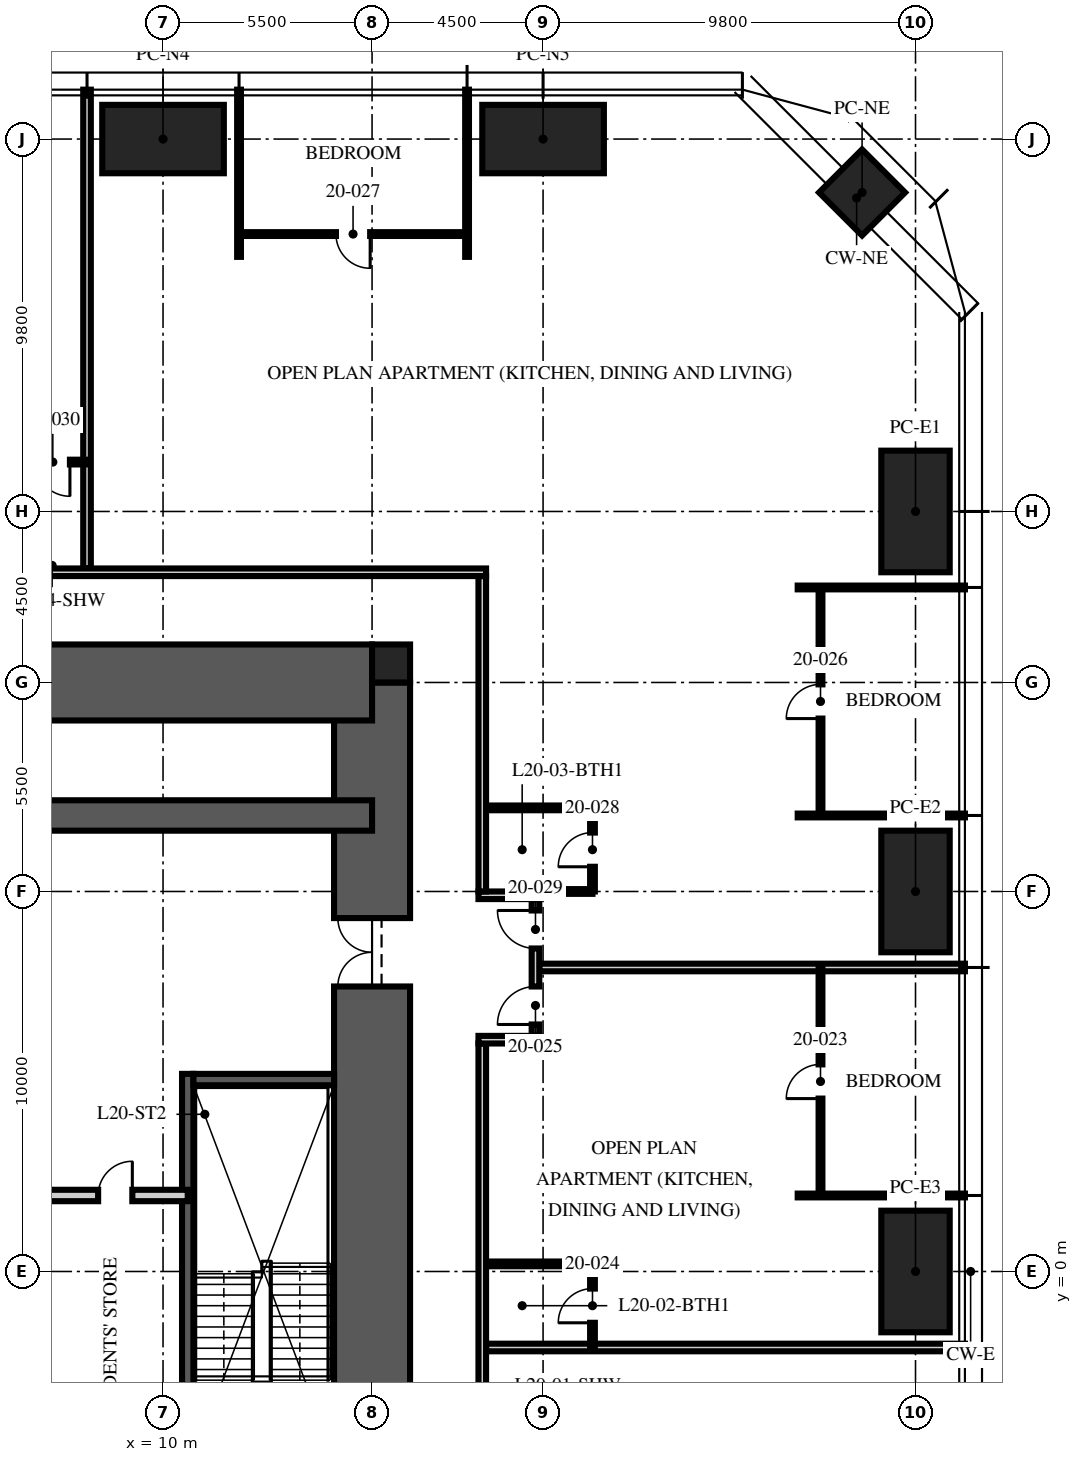
"""IFC4 building model, lengths in metres.
Left out: names, types, materials, properties, quantities, classifications, styles, units other than length and angle.
Written with IfcOpenShell. Run it as: python <this file> out.ifc"""

import sys

from ifc_helpers import new_model, si_unit, direction, frame, frame_2d, origin, origin_2d, place, context, subcontext, project, spatial, rectangle, hollow_rectangle, extrude, element, fill, save


model = new_model("IFC4")
c1 = context("Model", 3, precision=1e-05, world=origin(), true_north=direction((0.0, 1.0)))
c2 = subcontext(c1, "Body", "Model", "MODEL_VIEW")
j1 = project(units=[si_unit("LENGTHUNIT", "METRE"), si_unit("PLANEANGLEUNIT", "RADIAN")], contexts=[c1])
p1 = place(None, origin())
s1 = spatial("IfcSite", under=j1, at=p1, CompositionType="ELEMENT")
p2 = place(p1, origin())
s2 = spatial("IfcBuilding", under=s1, at=p2, CompositionType="ELEMENT")
p3 = place(p2, frame((0.0, 0.0, 81.0)))
s3 = spatial("IfcBuildingStorey", under=s2, at=p3, CompositionType="ELEMENT", Elevation=81.0)
p4 = place(p3, frame((15.5, -15.5, -0.25), z_axis=(0.0, 0.0, 1.0), x_axis=(0.0, 1.0, 0.0)))
e1 = element("IfcWall", 1, at=p4, inside=s3, PredefinedType="SHEAR", context=c2, shape_type="SweptSolid", body=[
    extrude(rectangle(XDim=31.0, YDim=2.0, at=frame_2d((15.5, 0.0))), origin(), (0.0, 0.0, 1.0), 3.75),
])
p5 = place(p4, frame((6.5, 0.0, 0.25)))
e2 = element("IfcOpeningElement", 2, at=p5, cuts=e1, PredefinedType="OPENING", context=c2, shape_type="SweptSolid", body=[
    extrude(rectangle(XDim=1.2, YDim=2.1, at=frame_2d((0.6, 1.05))), frame((0.0, 1.01, 0.0), z_axis=(0.0, -1.0, 0.0), x_axis=(1.0, 0.0, 0.0)), (0.0, 0.0, 1.0), 2.02),
])
p6 = place(p4, frame((23.0, 0.0, 0.25)))
e3 = element("IfcOpeningElement", 3, at=p6, cuts=e1, PredefinedType="OPENING", context=c2, shape_type="SweptSolid", body=[
    extrude(rectangle(XDim=1.8, YDim=2.1, at=frame_2d((0.9, 1.05))), frame((0.0, 1.01, 0.0), z_axis=(0.0, -1.0, 0.0), x_axis=(1.0, 0.0, 0.0)), (0.0, 0.0, 1.0), 2.02),
])
p7 = place(p3, frame((-15.5, 15.5, -0.25), z_axis=(0.0, 0.0, 1.0), x_axis=(1.0, 0.0, 0.0)))
e4 = element("IfcWall", 4, at=p7, inside=s3, PredefinedType="SHEAR", context=c2, shape_type="SweptSolid", body=[
    extrude(rectangle(XDim=31.0, YDim=2.0, at=frame_2d((15.5, 0.0))), origin(), (0.0, 0.0, 1.0), 3.75),
])
p8 = place(p7, frame((10.4, 0.0, 0.25)))
e5 = element("IfcOpeningElement", 5, at=p8, cuts=e4, PredefinedType="OPENING", context=c2, shape_type="SweptSolid", body=[
    extrude(rectangle(XDim=1.1, YDim=2.1, at=frame_2d((0.55, 1.05))), frame((0.0, 1.01, 0.0), z_axis=(0.0, -1.0, 0.0), x_axis=(1.0, 0.0, 0.0)), (0.0, 0.0, 1.0), 2.02),
])
p9 = place(p7, frame((13.5, 0.0, 0.25)))
e6 = element("IfcOpeningElement", 6, at=p9, cuts=e4, PredefinedType="OPENING", context=c2, shape_type="SweptSolid", body=[
    extrude(rectangle(XDim=1.1, YDim=2.1, at=frame_2d((0.55, 1.05))), frame((0.0, 1.01, 0.0), z_axis=(0.0, -1.0, 0.0), x_axis=(1.0, 0.0, 0.0)), (0.0, 0.0, 1.0), 2.02),
])
p10 = place(p7, frame((16.6, 0.0, 0.25)))
e7 = element("IfcOpeningElement", 7, at=p10, cuts=e4, PredefinedType="OPENING", context=c2, shape_type="SweptSolid", body=[
    extrude(rectangle(XDim=1.1, YDim=2.1, at=frame_2d((0.55, 1.05))), frame((0.0, 1.01, 0.0), z_axis=(0.0, -1.0, 0.0), x_axis=(1.0, 0.0, 0.0)), (0.0, 0.0, 1.0), 2.02),
])
p11 = place(p3, frame((-15.5, 12.0, -0.25), z_axis=(0.0, 0.0, 1.0), x_axis=(1.0, 0.0, 0.0)))
e8 = element("IfcWall", 8, at=p11, inside=s3, PredefinedType="SHEAR", context=c2, shape_type="SweptSolid", body=[
    extrude(rectangle(XDim=31.0, YDim=0.8, at=frame_2d((15.5, 0.0))), origin(), (0.0, 0.0, 1.0), 3.75),
])
p12 = place(p3, frame((16.0, 16.0, -0.25), z_axis=(0.0, 0.0, 1.0), x_axis=(1.0, 0.0, 0.0)))
e9 = element("IfcColumn", 9, at=p12, inside=s3, PredefinedType="COLUMN", context=c2, shape_type="SweptSolid", body=[
    extrude(rectangle(XDim=1.0, YDim=1.0, at=origin_2d()), origin(), (0.0, 0.0, 1.0), 3.75),
])
for number, where, z_axis, x_axis in (
    (10, (10.0, 29.8, 0.0), (0.0, 0.0, 1.0), (1.0, 0.0, 0.0)),
    (11, (20.0, 29.8, 0.0), (0.0, 0.0, 1.0), (1.0, 0.0, 0.0)),
    (12, (29.8, 20.0, 0.0), (0.0, 0.0, 1.0), (0.0, 1.0, 0.0)),
    (13, (29.8, 10.0, 0.0), (0.0, 0.0, 1.0), (0.0, 1.0, 0.0)),
    (14, (29.8, 0.0, 0.0), (0.0, 0.0, 1.0), (0.0, 1.0, 0.0)),
):
    element("IfcColumn", number, at=place(p3, frame(where, z_axis=z_axis, x_axis=x_axis)), inside=s3, PredefinedType="COLUMN", context=c2, shape_type="SweptSolid", body=[
        extrude(hollow_rectangle(XDim=3.2, YDim=1.8, WallThickness=0.2, at=origin_2d()), origin(), (0.0, 0.0, 1.0), 3.75),
    ])
p13 = place(p3, frame((28.394, 28.394, 0.0), z_axis=(0.0, 0.0, 1.0), x_axis=(0.707106781187, -0.707106781187, 0.0)))
e15 = element("IfcColumn", 15, at=p13, inside=s3, PredefinedType="COLUMN", context=c2, shape_type="SweptSolid", body=[
    extrude(hollow_rectangle(XDim=1.6, YDim=1.6, WallThickness=0.1, at=origin_2d()), origin(), (0.0, 0.0, 1.0), 3.75),
])
p14 = place(p3, frame((10.65, -4.9, 0.0), z_axis=(0.0, 0.0, 1.0), x_axis=(0.0, 1.0, 0.0)))
e16 = element("IfcWall", 16, at=p14, inside=s3, PredefinedType="SOLIDWALL", context=c2, shape_type="SweptSolid", body=[
    extrude(rectangle(XDim=10.1, YDim=0.3, at=frame_2d((5.05, 0.0))), origin(), (0.0, 0.0, 1.0), 3.5),
])
p15 = place(p3, frame((14.5, 5.05, 0.0), z_axis=(0.0, 0.0, 1.0), x_axis=(-1.0, 0.0, 0.0)))
e17 = element("IfcWall", 17, at=p15, inside=s3, PredefinedType="SOLIDWALL", context=c2, shape_type="SweptSolid", body=[
    extrude(rectangle(XDim=3.7, YDim=0.3, at=frame_2d((1.85, 0.0))), origin(), (0.0, 0.0, 1.0), 3.5),
])
p16 = place(p3, frame((-10.65, 2.0, 0.0), z_axis=(0.0, 0.0, 1.0), x_axis=(1.0, 0.0, 0.0)))
e18 = element("IfcWall", 18, at=p16, inside=s3, PredefinedType="PARTITIONING", context=c2, shape_type="SweptSolid", body=[
    extrude(rectangle(XDim=21.3, YDim=0.3, at=frame_2d((10.65, 0.0))), origin(), (0.0, 0.0, 1.0), 3.5),
])
p17 = place(p16, frame((10.05, 0.0, 0.0)))
e19 = element("IfcOpeningElement", 19, at=p17, cuts=e18, PredefinedType="OPENING", context=c2, shape_type="SweptSolid", body=[
    extrude(rectangle(XDim=1.2, YDim=2.1, at=frame_2d((0.6, 1.05))), frame((0.0, 0.16, 0.0), z_axis=(0.0, -1.0, 0.0), x_axis=(1.0, 0.0, 0.0)), (0.0, 0.0, 1.0), 0.32),
])
p18 = place(p16, frame((18.942, 0.0, 0.0)))
e20 = element("IfcOpeningElement", 20, at=p18, cuts=e18, PredefinedType="OPENING", context=c2, shape_type="SweptSolid", body=[
    extrude(rectangle(XDim=0.9, YDim=2.1, at=frame_2d((0.45, 1.05))), frame((0.0, 0.16, 0.0), z_axis=(0.0, -1.0, 0.0), x_axis=(1.0, 0.0, 0.0)), (0.0, 0.0, 1.0), 0.32),
])
p19 = place(p3, frame((18.5, -2.0, 0.0), z_axis=(0.0, 0.0, 1.0), x_axis=(1.0, 0.0, 0.0)))
e21 = element("IfcWall", 21, at=p19, inside=s3, PredefinedType="PARTITIONING", context=c2, shape_type="SweptSolid", body=[
    extrude(rectangle(XDim=12.6, YDim=0.2, at=frame_2d((6.3, 0.0))), origin(), (0.0, 0.0, 1.0), 2.71),
])
p20 = place(p3, frame((26.7, 2.0, 0.0), z_axis=(0.0, 0.0, 1.0), x_axis=(1.0, 0.0, 0.0)))
e22 = element("IfcWall", 22, at=p20, inside=s3, PredefinedType="PARTITIONING", context=c2, shape_type="SweptSolid", body=[
    extrude(rectangle(XDim=4.4, YDim=0.1, at=frame_2d((2.2, 0.0))), origin(), (0.0, 0.0, 1.0), 2.71),
])
p21 = place(p3, frame((19.9, 8.0, 0.0), z_axis=(0.0, 0.0, 1.0), x_axis=(1.0, 0.0, 0.0)))
e23 = element("IfcWall", 23, at=p21, inside=s3, PredefinedType="PARTITIONING", context=c2, shape_type="SweptSolid", body=[
    extrude(rectangle(XDim=11.2, YDim=0.2, at=frame_2d((5.6, 0.0))), origin(), (0.0, 0.0, 1.0), 2.71),
])
for number, where, z_axis, x_axis in (
    (24, (26.7, 12.0, 0.0), (0.0, 0.0, 1.0), (1.0, 0.0, 0.0)),
    (25, (26.7, 18.0, 0.0), (0.0, 0.0, 1.0), (1.0, 0.0, 0.0)),
    (26, (18.0, 26.7, 0.0), (0.0, 0.0, 1.0), (0.0, 1.0, 0.0)),
    (27, (12.0, 26.7, 0.0), (0.0, 0.0, 1.0), (0.0, 1.0, 0.0)),
):
    element("IfcWall", number, at=place(p3, frame(where, z_axis=z_axis, x_axis=x_axis)), inside=s3, PredefinedType="PARTITIONING", context=c2, shape_type="SweptSolid", body=[
        extrude(rectangle(XDim=4.4, YDim=0.1, at=frame_2d((2.2, 0.0))), origin(), (0.0, 0.0, 1.0), 2.71),
    ])
p22 = place(p3, frame((8.0, 18.5, 0.0), z_axis=(0.0, 0.0, 1.0), x_axis=(0.0, 1.0, 0.0)))
e28 = element("IfcWall", 28, at=p22, inside=s3, PredefinedType="PARTITIONING", context=c2, shape_type="SweptSolid", body=[
    extrude(rectangle(XDim=12.6, YDim=0.2, at=frame_2d((6.3, 0.0))), origin(), (0.0, 0.0, 1.0), 2.71),
])
p23 = place(p3, frame((27.3, 2.0, 0.0), z_axis=(0.0, 0.0, 1.0), x_axis=(0.0, 1.0, 0.0)))
e29 = element("IfcWall", 29, at=p23, inside=s3, PredefinedType="PARTITIONING", context=c2, shape_type="SweptSolid", body=[
    extrude(rectangle(XDim=6.0, YDim=0.1, at=frame_2d((3.0, 0.0))), origin(), (0.0, 0.0, 1.0), 2.61),
])
p24 = place(p23, frame((2.55, 0.0, 0.0)))
e30 = element("IfcOpeningElement", 30, at=p24, cuts=e29, PredefinedType="OPENING", context=c2, shape_type="SweptSolid", body=[
    extrude(rectangle(XDim=0.9, YDim=2.1, at=frame_2d((0.45, 1.05))), frame((0.0, 0.06, 0.0), z_axis=(0.0, -1.0, 0.0), x_axis=(1.0, 0.0, 0.0)), (0.0, 0.0, 1.0), 0.12),
])
p25 = place(p3, frame((21.3, -2.0, 0.0), z_axis=(0.0, 0.0, 1.0), x_axis=(0.0, 1.0, 0.0)))
e31 = element("IfcWall", 31, at=p25, inside=s3, PredefinedType="PARTITIONING", context=c2, shape_type="SweptSolid", body=[
    extrude(rectangle(XDim=2.2, YDim=0.125, at=frame_2d((1.1, 0.0))), origin(), (0.0, 0.0, 1.0), 2.492),
])
p26 = place(p25, frame((0.65, 0.0, 0.0)))
e32 = element("IfcOpeningElement", 32, at=p26, cuts=e31, PredefinedType="OPENING", context=c2, shape_type="SweptSolid", body=[
    extrude(rectangle(XDim=0.9, YDim=2.1, at=frame_2d((0.45, 1.05))), frame((0.0, 0.073, 0.0), z_axis=(0.0, -1.0, 0.0), x_axis=(1.0, 0.0, 0.0)), (0.0, 0.0, 1.0), 0.145),
])
p27 = place(p3, frame((18.5, 0.2, 0.0), z_axis=(0.0, 0.0, 1.0), x_axis=(1.0, 0.0, 0.0)))
e33 = element("IfcWall", 33, at=p27, inside=s3, PredefinedType="PARTITIONING", context=c2, shape_type="SweptSolid", body=[
    extrude(rectangle(XDim=2.8, YDim=0.125, at=frame_2d((1.4, 0.0))), origin(), (0.0, 0.0, 1.0), 2.492),
])
p28 = place(p3, frame((27.3, 12.0, 0.0), z_axis=(0.0, 0.0, 1.0), x_axis=(0.0, 1.0, 0.0)))
e34 = element("IfcWall", 34, at=p28, inside=s3, PredefinedType="PARTITIONING", context=c2, shape_type="SweptSolid", body=[
    extrude(rectangle(XDim=6.0, YDim=0.1, at=frame_2d((3.0, 0.0))), origin(), (0.0, 0.0, 1.0), 2.61),
])
p29 = place(p28, frame((2.55, 0.0, 0.0)))
e35 = element("IfcOpeningElement", 35, at=p29, cuts=e34, PredefinedType="OPENING", context=c2, shape_type="SweptSolid", body=[
    extrude(rectangle(XDim=0.9, YDim=2.1, at=frame_2d((0.45, 1.05))), frame((0.0, 0.06, 0.0), z_axis=(0.0, -1.0, 0.0), x_axis=(1.0, 0.0, 0.0)), (0.0, 0.0, 1.0), 0.12),
])
p30 = place(p3, frame((18.0, 27.3, 0.0), z_axis=(0.0, 0.0, 1.0), x_axis=(-1.0, 0.0, 0.0)))
e36 = element("IfcWall", 36, at=p30, inside=s3, PredefinedType="PARTITIONING", context=c2, shape_type="SweptSolid", body=[
    extrude(rectangle(XDim=6.0, YDim=0.1, at=frame_2d((3.0, 0.0))), origin(), (0.0, 0.0, 1.0), 2.61),
])
p31 = place(p30, frame((2.55, 0.0, 0.0)))
e37 = element("IfcOpeningElement", 37, at=p31, cuts=e36, PredefinedType="OPENING", context=c2, shape_type="SweptSolid", body=[
    extrude(rectangle(XDim=0.9, YDim=2.1, at=frame_2d((0.45, 1.05))), frame((0.0, 0.06, 0.0), z_axis=(0.0, -1.0, 0.0), x_axis=(1.0, 0.0, 0.0)), (0.0, 0.0, 1.0), 0.12),
])
p32 = place(p3, frame((21.3, 10.0, 0.0), z_axis=(0.0, 0.0, 1.0), x_axis=(0.0, 1.0, 0.0)))
e38 = element("IfcWall", 38, at=p32, inside=s3, PredefinedType="PARTITIONING", context=c2, shape_type="SweptSolid", body=[
    extrude(rectangle(XDim=2.2, YDim=0.125, at=frame_2d((1.1, 0.0))), origin(), (0.0, 0.0, 1.0), 2.492),
])
p33 = place(p32, frame((0.65, 0.0, 0.0)))
e39 = element("IfcOpeningElement", 39, at=p33, cuts=e38, PredefinedType="OPENING", context=c2, shape_type="SweptSolid", body=[
    extrude(rectangle(XDim=0.9, YDim=2.1, at=frame_2d((0.45, 1.05))), frame((0.0, 0.073, 0.0), z_axis=(0.0, -1.0, 0.0), x_axis=(1.0, 0.0, 0.0)), (0.0, 0.0, 1.0), 0.145),
])
p34 = place(p3, frame((19.97, 10.0, 0.0), z_axis=(0.0, 0.0, 1.0), x_axis=(1.0, 0.0, 0.0)))
e40 = element("IfcWall", 40, at=p34, inside=s3, PredefinedType="PARTITIONING", context=c2, shape_type="SweptSolid", body=[
    extrude(rectangle(XDim=1.33, YDim=0.125, at=frame_2d((0.665, 0.0))), origin(), (0.0, 0.0, 1.0), 2.492),
])
p35 = place(p3, frame((18.5, 12.2, 0.0), z_axis=(0.0, 0.0, 1.0), x_axis=(1.0, 0.0, 0.0)))
e41 = element("IfcWall", 41, at=p35, inside=s3, PredefinedType="PARTITIONING", context=c2, shape_type="SweptSolid", body=[
    extrude(rectangle(XDim=2.8, YDim=0.125, at=frame_2d((1.4, 0.0))), origin(), (0.0, 0.0, 1.0), 3.5),
])
p36 = place(p3, frame((8.0, 21.3, 0.0), z_axis=(0.0, 0.0, 1.0), x_axis=(-1.0, 0.0, 0.0)))
e42 = element("IfcWall", 42, at=p36, inside=s3, PredefinedType="PARTITIONING", context=c2, shape_type="SweptSolid", body=[
    extrude(rectangle(XDim=1.8, YDim=0.125, at=frame_2d((0.9, 0.0))), origin(), (0.0, 0.0, 1.0), 3.5),
])
p37 = place(p36, frame((0.45, 0.0, 0.0)))
e43 = element("IfcOpeningElement", 43, at=p37, cuts=e42, PredefinedType="OPENING", context=c2, shape_type="SweptSolid", body=[
    extrude(rectangle(XDim=0.9, YDim=2.1, at=frame_2d((0.45, 1.05))), frame((0.0, 0.073, 0.0), z_axis=(0.0, -1.0, 0.0), x_axis=(1.0, 0.0, 0.0)), (0.0, 0.0, 1.0), 0.145),
])
p38 = place(p3, frame((18.4, -6.0, 0.0), z_axis=(0.0, 0.0, 1.0), x_axis=(0.0, 1.0, 0.0)))
e44 = element("IfcWall", 44, at=p38, inside=s3, PredefinedType="PARTITIONING", context=c2, shape_type="SweptSolid", body=[
    extrude(rectangle(XDim=12.0, YDim=0.2, at=frame_2d((6.0, 0.0))), origin(), (0.0, 0.0, 1.0), 2.492),
])
p39 = place(p3, frame((18.3, 6.1, 0.0), z_axis=(0.0, 0.0, 1.0), x_axis=(1.0, 0.0, 0.0)))
e45 = element("IfcWall", 45, at=p39, inside=s3, PredefinedType="PARTITIONING", context=c2, shape_type="SweptSolid", body=[
    extrude(rectangle(XDim=1.6, YDim=0.2, at=frame_2d((0.8, 0.0))), origin(), (0.0, 0.0, 1.0), 3.5),
])
p40 = place(p3, frame((18.3, 9.9, 0.0), z_axis=(0.0, 0.0, 1.0), x_axis=(1.0, 0.0, 0.0)))
e46 = element("IfcWall", 46, at=p40, inside=s3, PredefinedType="PARTITIONING", context=c2, shape_type="SweptSolid", body=[
    extrude(rectangle(XDim=1.6, YDim=0.2, at=frame_2d((0.8, 0.0))), origin(), (0.0, 0.0, 1.0), 2.492),
])
p41 = place(p3, frame((19.8, 6.2, 0.0), z_axis=(0.0, 0.0, 1.0), x_axis=(0.0, 1.0, 0.0)))
e47 = element("IfcWall", 47, at=p41, inside=s3, PredefinedType="PARTITIONING", context=c2, shape_type="SweptSolid", body=[
    extrude(rectangle(XDim=3.6, YDim=0.2, at=frame_2d((1.8, 0.0))), origin(), (0.0, 0.0, 1.0), 3.5),
])
p42 = place(p41, frame((0.3, 0.0, 0.0)))
e48 = element("IfcOpeningElement", 48, at=p42, cuts=e47, PredefinedType="OPENING", context=c2, shape_type="SweptSolid", body=[
    extrude(rectangle(XDim=1.0, YDim=2.2, at=frame_2d((0.5, 1.1))), frame((0.0, 0.11, 0.0), z_axis=(0.0, -1.0, 0.0), x_axis=(1.0, 0.0, 0.0)), (0.0, 0.0, 1.0), 0.22),
])
p43 = place(p41, frame((2.3, 0.0, 0.0)))
e49 = element("IfcOpeningElement", 49, at=p43, cuts=e47, PredefinedType="OPENING", context=c2, shape_type="SweptSolid", body=[
    extrude(rectangle(XDim=1.0, YDim=2.2, at=frame_2d((0.5, 1.1))), frame((0.0, 0.11, 0.0), z_axis=(0.0, -1.0, 0.0), x_axis=(1.0, 0.0, 0.0)), (0.0, 0.0, 1.0), 0.22),
])
p44 = place(p3, frame((18.4, 10.0, 0.0), z_axis=(0.0, 0.0, 1.0), x_axis=(0.0, 1.0, 0.0)))
e50 = element("IfcWall", 50, at=p44, inside=s3, PredefinedType="PARTITIONING", context=c2, shape_type="SweptSolid", body=[
    extrude(rectangle(XDim=8.3, YDim=0.2, at=frame_2d((4.15, 0.0))), origin(), (0.0, 0.0, 1.0), 2.3),
])
p45 = place(p3, frame((4.0, 18.4, 0.0), z_axis=(0.0, 0.0, 1.0), x_axis=(1.0, 0.0, 0.0)))
e51 = element("IfcWall", 51, at=p45, inside=s3, PredefinedType="PARTITIONING", context=c2, shape_type="SweptSolid", body=[
    extrude(rectangle(XDim=14.5, YDim=0.2, at=frame_2d((7.25, 0.0))), origin(), (0.0, 0.0, 1.0), 2.3),
])
p46 = place(p6, origin())
e52 = element("IfcDoor", 52, at=p46, inside=s3, OperationType="DOUBLE_DOOR_SINGLE_SWING", PredefinedType="DOOR", context=c2, shape_type="SweptSolid", body=[
    extrude(rectangle(XDim=1.8, YDim=2.1, at=frame_2d((0.9, 1.05))), frame((0.0, 0.025, 0.0), z_axis=(0.0, -1.0, 0.0), x_axis=(1.0, 0.0, 0.0)), (0.0, 0.0, 1.0), 0.05),
])
fill(e3, e52)
p47 = place(p18, origin())
e53 = element("IfcDoor", 53, at=p47, inside=s3, OperationType="SINGLE_SWING_RIGHT", PredefinedType="DOOR", context=c2, shape_type="SweptSolid", body=[
    extrude(rectangle(XDim=0.9, YDim=2.1, at=frame_2d((0.45, 1.05))), frame((0.0, 0.025, 0.0), z_axis=(0.0, -1.0, 0.0), x_axis=(1.0, 0.0, 0.0)), (0.0, 0.0, 1.0), 0.05),
])
fill(e20, e53)
p48 = place(p24, origin())
e54 = element("IfcDoor", 54, at=p48, inside=s3, OperationType="SINGLE_SWING_LEFT", PredefinedType="DOOR", context=c2, shape_type="SweptSolid", body=[
    extrude(rectangle(XDim=0.9, YDim=2.1, at=frame_2d((0.45, 1.05))), frame((0.0, 0.025, 0.0), z_axis=(0.0, -1.0, 0.0), x_axis=(1.0, 0.0, 0.0)), (0.0, 0.0, 1.0), 0.05),
])
fill(e30, e54)
p49 = place(p26, origin())
e55 = element("IfcDoor", 55, at=p49, inside=s3, OperationType="SINGLE_SWING_LEFT", PredefinedType="DOOR", context=c2, shape_type="SweptSolid", body=[
    extrude(rectangle(XDim=0.9, YDim=2.1, at=frame_2d((0.45, 1.05))), frame((0.0, 0.025, 0.0), z_axis=(0.0, -1.0, 0.0), x_axis=(1.0, 0.0, 0.0)), (0.0, 0.0, 1.0), 0.05),
])
fill(e32, e55)
p50 = place(p42, origin())
e56 = element("IfcDoor", 56, at=p50, inside=s3, OperationType="SINGLE_SWING_LEFT", PredefinedType="DOOR", context=c2, shape_type="SweptSolid", body=[
    extrude(rectangle(XDim=1.0, YDim=2.2, at=frame_2d((0.5, 1.1))), frame((0.0, 0.025, 0.0), z_axis=(0.0, -1.0, 0.0), x_axis=(1.0, 0.0, 0.0)), (0.0, 0.0, 1.0), 0.05),
])
fill(e48, e56)
p51 = place(p29, origin())
e57 = element("IfcDoor", 57, at=p51, inside=s3, OperationType="SINGLE_SWING_LEFT", PredefinedType="DOOR", context=c2, shape_type="SweptSolid", body=[
    extrude(rectangle(XDim=0.9, YDim=2.1, at=frame_2d((0.45, 1.05))), frame((0.0, 0.025, 0.0), z_axis=(0.0, -1.0, 0.0), x_axis=(1.0, 0.0, 0.0)), (0.0, 0.0, 1.0), 0.05),
])
fill(e35, e57)
p52 = place(p31, origin())
e58 = element("IfcDoor", 58, at=p52, inside=s3, OperationType="SINGLE_SWING_LEFT", PredefinedType="DOOR", context=c2, shape_type="SweptSolid", body=[
    extrude(rectangle(XDim=0.9, YDim=2.1, at=frame_2d((0.45, 1.05))), frame((0.0, 0.025, 0.0), z_axis=(0.0, -1.0, 0.0), x_axis=(1.0, 0.0, 0.0)), (0.0, 0.0, 1.0), 0.05),
])
fill(e37, e58)
p53 = place(p33, origin())
e59 = element("IfcDoor", 59, at=p53, inside=s3, OperationType="SINGLE_SWING_LEFT", PredefinedType="DOOR", context=c2, shape_type="SweptSolid", body=[
    extrude(rectangle(XDim=0.9, YDim=2.1, at=frame_2d((0.45, 1.05))), frame((0.0, 0.025, 0.0), z_axis=(0.0, -1.0, 0.0), x_axis=(1.0, 0.0, 0.0)), (0.0, 0.0, 1.0), 0.05),
])
fill(e39, e59)
p54 = place(p43, origin())
e60 = element("IfcDoor", 60, at=p54, inside=s3, OperationType="SINGLE_SWING_RIGHT", PredefinedType="DOOR", context=c2, shape_type="SweptSolid", body=[
    extrude(rectangle(XDim=1.0, YDim=2.2, at=frame_2d((0.5, 1.1))), frame((0.0, 0.025, 0.0), z_axis=(0.0, -1.0, 0.0), x_axis=(1.0, 0.0, 0.0)), (0.0, 0.0, 1.0), 0.05),
])
fill(e49, e60)
p55 = place(p37, origin())
e61 = element("IfcDoor", 61, at=p55, inside=s3, OperationType="SINGLE_SWING_LEFT", PredefinedType="DOOR", context=c2, shape_type="SweptSolid", body=[
    extrude(rectangle(XDim=0.9, YDim=2.1, at=frame_2d((0.45, 1.05))), frame((0.0, 0.025, 0.0), z_axis=(0.0, -1.0, 0.0), x_axis=(1.0, 0.0, 0.0)), (0.0, 0.0, 1.0), 0.05),
])
fill(e43, e61)
save(model, sys.argv[1])
